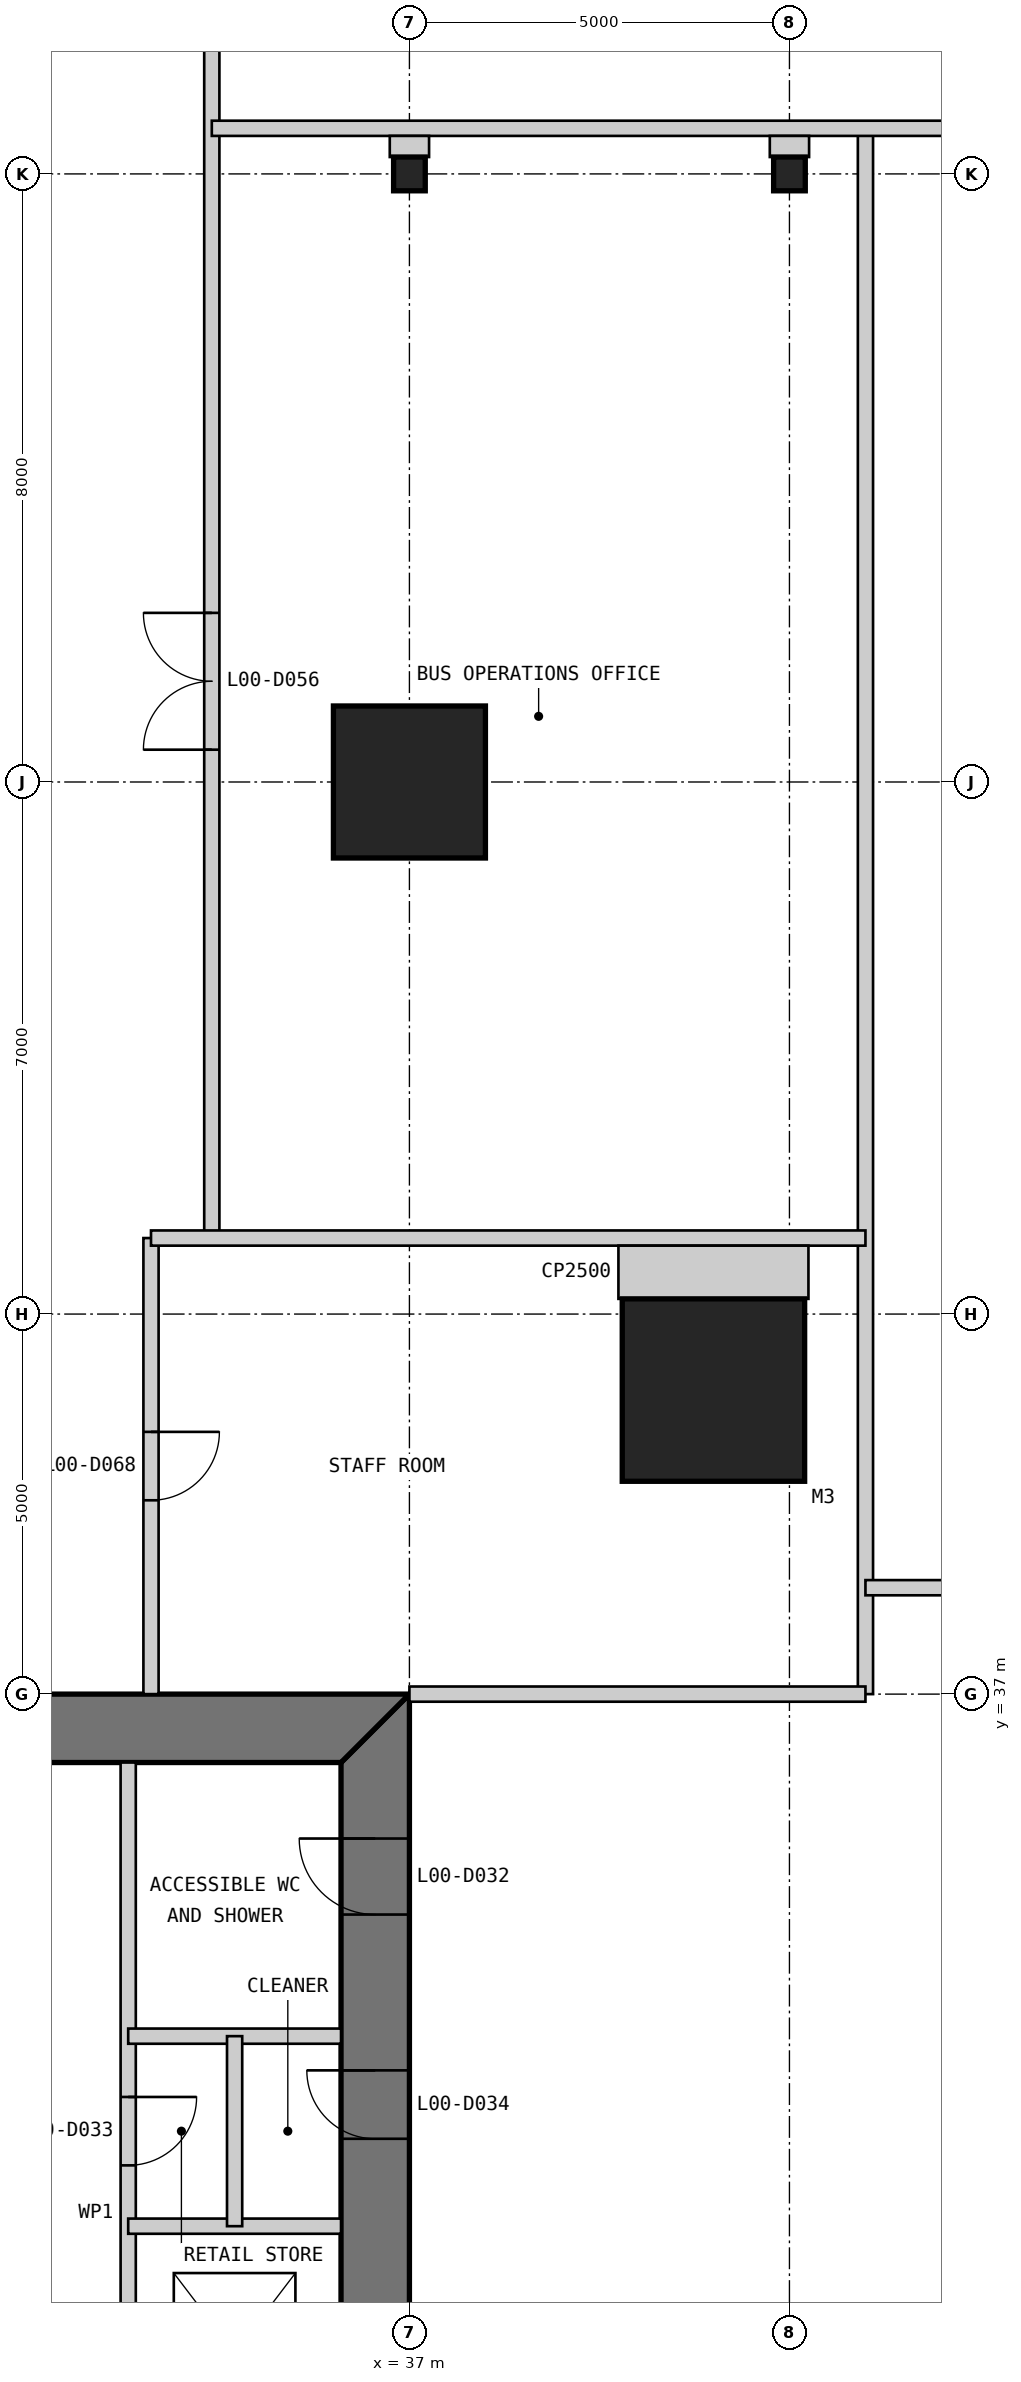
"""IFC4 building model, lengths in metres.
Left out: names, types, materials, properties, quantities, classifications, styles, units other than length and angle.
Written with IfcOpenShell. Run it as: python <this file> out.ifc"""

import sys

from ifc_helpers import new_model, si_unit, direction, frame, frame_2d, origin, origin_2d, place, context, subcontext, project, spatial, polyline, rectangle, i_section, outline, extrude, element, fill, save


model = new_model("IFC4")
c1 = context("Model", 3, precision=1e-05, world=origin(), true_north=direction((0.0, 1.0)))
c2 = subcontext(c1, "Body", "Model", "MODEL_VIEW")
j1 = project(units=[si_unit("LENGTHUNIT", "METRE"), si_unit("PLANEANGLEUNIT", "RADIAN")], contexts=[c1])
p1 = place(None, origin())
s1 = spatial("IfcSite", under=j1, at=p1, CompositionType="ELEMENT")
p2 = place(p1, origin())
s2 = spatial("IfcBuilding", under=s1, at=p2, CompositionType="ELEMENT")
p3 = place(p2, origin())
s3 = spatial("IfcBuildingStorey", under=s2, at=p3, CompositionType="ELEMENT", Elevation=0.0)
p4 = place(p3, frame((41.0, 41.0, 0.0), z_axis=(0.0, 0.0, 1.0), x_axis=(1.0, 0.0, 0.0)))
e1 = element("IfcColumn", 1, at=p4, inside=s3, PredefinedType="COLUMN", context=c2, shape_type="SweptSolid", body=[
    extrude(rectangle(XDim=2.4, YDim=2.4, at=origin_2d()), origin(), (0.0, 0.0, 1.0), 7.0),
])
p5 = place(p3, frame((37.0, 49.0, 0.0), z_axis=(0.0, 0.0, 1.0), x_axis=(1.0, 0.0, 0.0)))
e2 = element("IfcColumn", 2, at=p5, inside=s3, PredefinedType="COLUMN", context=c2, shape_type="SweptSolid", body=[
    extrude(rectangle(XDim=2.0, YDim=2.0, at=origin_2d()), origin(), (0.0, 0.0, 1.0), 7.0),
])
for number, where, z_axis, x_axis in (
    (3, (37.0, 57.0, 0.0), (0.0, 0.0, 1.0), (1.0, 0.0, 0.0)),
    (4, (42.0, 57.0, 0.0), (0.0, 0.0, 1.0), (1.0, 0.0, 0.0)),
):
    element("IfcColumn", number, at=place(p3, frame(where, z_axis=z_axis, x_axis=x_axis)), inside=s3, PredefinedType="COLUMN", context=c2, shape_type="SweptSolid", body=[
        extrude(i_section(OverallWidth=0.417, OverallDepth=0.445, WebThickness=0.039, FlangeThickness=0.063, at=origin_2d()), origin(), (0.0, 0.0, 1.0), 7.0),
    ])
p6 = place(p3, frame((36.55, 13.9, 0.0), z_axis=(0.0, 0.0, 1.0), x_axis=(0.0, 1.0, 0.0)))
e5 = element("IfcWall", 5, at=p6, inside=s3, PredefinedType="SHEAR", context=c2, shape_type="SweptSolid", body=[
    extrude(outline(polyline([(-0.9, -0.45), (23.1, -0.45), (22.2, 0.45), (0.0, 0.45), (-0.9, -0.45)])), origin(), (0.0, 0.0, 1.0), 7.0),
])
p7 = place(p6, frame((20.2, 0.0, 0.0)))
e6 = element("IfcOpeningElement", 6, at=p7, cuts=e5, PredefinedType="OPENING", context=c2, shape_type="SweptSolid", body=[
    extrude(rectangle(XDim=1.0, YDim=2.2, at=frame_2d((0.5, 1.1))), frame((0.0, 0.46, 0.0), z_axis=(0.0, -1.0, 0.0), x_axis=(1.0, 0.0, 0.0)), (0.0, 0.0, 1.0), 0.92),
])
p8 = place(p6, frame((17.25, 0.0, 0.0)))
e7 = element("IfcOpeningElement", 7, at=p8, cuts=e5, PredefinedType="OPENING", context=c2, shape_type="SweptSolid", body=[
    extrude(rectangle(XDim=0.9, YDim=2.2, at=frame_2d((0.45, 1.1))), frame((0.0, 0.46, 0.0), z_axis=(0.0, -1.0, 0.0), x_axis=(1.0, 0.0, 0.0)), (0.0, 0.0, 1.0), 0.92),
])
p9 = place(p3, frame((37.0, 36.55, 0.0), z_axis=(0.0, 0.0, 1.0), x_axis=(-1.0, 0.0, 0.0)))
e8 = element("IfcWall", 8, at=p9, inside=s3, PredefinedType="SHEAR", context=c2, shape_type="SweptSolid", body=[
    extrude(outline(polyline([(0.0, -0.45), (24.0, -0.45), (23.1, 0.45), (0.9, 0.45), (0.0, -0.45)])), origin(), (0.0, 0.0, 1.0), 7.0),
])
p10 = place(p9, frame((4.9, 0.0, 0.0)))
e9 = element("IfcOpeningElement", 9, at=p10, cuts=e8, PredefinedType="OPENING", context=c2, shape_type="SweptSolid", body=[
    extrude(rectangle(XDim=1.0, YDim=2.2, at=frame_2d((0.5, 1.1))), frame((0.0, 0.46, 0.0), z_axis=(0.0, -1.0, 0.0), x_axis=(1.0, 0.0, 0.0)), (0.0, 0.0, 1.0), 0.92),
])
p11 = place(p9, frame((8.9, 0.0, 0.0)))
e10 = element("IfcOpeningElement", 10, at=p11, cuts=e8, PredefinedType="OPENING", context=c2, shape_type="SweptSolid", body=[
    extrude(rectangle(XDim=1.1, YDim=2.2, at=frame_2d((0.55, 1.1))), frame((0.0, 0.46, 0.0), z_axis=(0.0, -1.0, 0.0), x_axis=(1.0, 0.0, 0.0)), (0.0, 0.0, 1.0), 0.92),
])
p12 = place(p9, frame((15.05, 0.0, 0.0)))
e11 = element("IfcOpeningElement", 11, at=p12, cuts=e8, PredefinedType="OPENING", context=c2, shape_type="SweptSolid", body=[
    extrude(rectangle(XDim=0.9, YDim=2.2, at=frame_2d((0.45, 1.1))), frame((0.0, 0.46, 0.0), z_axis=(0.0, -1.0, 0.0), x_axis=(1.0, 0.0, 0.0)), (0.0, 0.0, 1.0), 0.92),
])
p13 = place(p9, frame((17.9, 0.0, 0.0)))
e12 = element("IfcOpeningElement", 12, at=p13, cuts=e8, PredefinedType="OPENING", context=c2, shape_type="SweptSolid", body=[
    extrude(rectangle(XDim=1.0, YDim=2.2, at=frame_2d((0.5, 1.1))), frame((0.0, 0.46, 0.0), z_axis=(0.0, -1.0, 0.0), x_axis=(1.0, 0.0, 0.0)), (0.0, 0.0, 1.0), 0.92),
])
p14 = place(p9, frame((21.4, 0.0, 0.0)))
e13 = element("IfcOpeningElement", 13, at=p14, cuts=e8, PredefinedType="OPENING", context=c2, shape_type="SweptSolid", body=[
    extrude(rectangle(XDim=1.0, YDim=2.2, at=frame_2d((0.5, 1.1))), frame((0.0, 0.46, 0.0), z_axis=(0.0, -1.0, 0.0), x_axis=(1.0, 0.0, 0.0)), (0.0, 0.0, 1.0), 0.92),
])
p15 = place(p3, frame((33.3, 36.1, 0.0), z_axis=(0.0, 0.0, 1.0), x_axis=(0.0, -1.0, 0.0)))
e14 = element("IfcWall", 14, at=p15, inside=s3, PredefinedType="PARTITIONING", context=c2, shape_type="SweptSolid", body=[
    extrude(rectangle(XDim=16.1, YDim=0.2, at=frame_2d((8.05, 0.0))), origin(), (0.0, 0.0, 1.0), 6.8),
])
p16 = place(p15, frame((4.4, 0.0, 0.0)))
e15 = element("IfcOpeningElement", 15, at=p16, cuts=e14, PredefinedType="OPENING", context=c2, shape_type="SweptSolid", body=[
    extrude(rectangle(XDim=0.9, YDim=2.2, at=frame_2d((0.45, 1.1))), frame((0.0, 0.11, 0.0), z_axis=(0.0, -1.0, 0.0), x_axis=(1.0, 0.0, 0.0)), (0.0, 0.0, 1.0), 0.22),
])
p17 = place(p15, frame((7.217, 0.0, 0.0)))
e16 = element("IfcOpeningElement", 16, at=p17, cuts=e14, PredefinedType="OPENING", context=c2, shape_type="SweptSolid", body=[
    extrude(rectangle(XDim=1.1, YDim=2.2, at=frame_2d((0.55, 1.1))), frame((0.0, 0.11, 0.0), z_axis=(0.0, -1.0, 0.0), x_axis=(1.0, 0.0, 0.0)), (0.0, 0.0, 1.0), 0.22),
])
p18 = place(p15, frame((10.55, 0.0, 0.0)))
e17 = element("IfcOpeningElement", 17, at=p18, cuts=e14, PredefinedType="OPENING", context=c2, shape_type="SweptSolid", body=[
    extrude(rectangle(XDim=1.1, YDim=2.2, at=frame_2d((0.55, 1.1))), frame((0.0, 0.11, 0.0), z_axis=(0.0, -1.0, 0.0), x_axis=(1.0, 0.0, 0.0)), (0.0, 0.0, 1.0), 0.22),
])
p19 = place(p15, frame((13.883, 0.0, 0.0)))
e18 = element("IfcOpeningElement", 18, at=p19, cuts=e14, PredefinedType="OPENING", context=c2, shape_type="SweptSolid", body=[
    extrude(rectangle(XDim=1.1, YDim=2.2, at=frame_2d((0.55, 1.1))), frame((0.0, 0.11, 0.0), z_axis=(0.0, -1.0, 0.0), x_axis=(1.0, 0.0, 0.0)), (0.0, 0.0, 1.0), 0.22),
])
for number, where, z_axis, x_axis in (
    (19, (36.1, 30.0, 0.0), (0.0, 0.0, 1.0), (-1.0, 0.0, 0.0)),
    (20, (36.1, 32.5, 0.0), (0.0, 0.0, 1.0), (-1.0, 0.0, 0.0)),
):
    element("IfcWall", number, at=place(p3, frame(where, z_axis=z_axis, x_axis=x_axis)), inside=s3, PredefinedType="PARTITIONING", context=c2, shape_type="SweptSolid", body=[
        extrude(rectangle(XDim=2.8, YDim=0.2, at=frame_2d((1.4, 0.0))), origin(), (0.0, 0.0, 1.0), 6.8),
    ])
p20 = place(p3, frame((34.7, 32.5, 0.0), z_axis=(0.0, 0.0, 1.0), x_axis=(0.0, -1.0, 0.0)))
e21 = element("IfcWall", 21, at=p20, inside=s3, PredefinedType="PARTITIONING", context=c2, shape_type="SweptSolid", body=[
    extrude(rectangle(XDim=2.5, YDim=0.2, at=frame_2d((1.25, 0.0))), origin(), (0.0, 0.0, 1.0), 6.8),
])
p21 = place(p3, frame((33.6, 37.0, 0.0), z_axis=(0.0, 0.0, 1.0), x_axis=(0.0, 1.0, 0.0)))
e22 = element("IfcWall", 22, at=p21, inside=s3, PredefinedType="PARTITIONING", context=c2, shape_type="SweptSolid", body=[
    extrude(rectangle(XDim=6.0, YDim=0.2, at=frame_2d((3.0, 0.0))), origin(), (0.0, 0.0, 1.0), 6.7),
])
p22 = place(p21, frame((2.55, 0.0, 0.0)))
e23 = element("IfcOpeningElement", 23, at=p22, cuts=e22, PredefinedType="OPENING", context=c2, shape_type="SweptSolid", body=[
    extrude(rectangle(XDim=0.9, YDim=2.2, at=frame_2d((0.45, 1.1))), frame((0.0, 0.11, 0.0), z_axis=(0.0, -1.0, 0.0), x_axis=(1.0, 0.0, 0.0)), (0.0, 0.0, 1.0), 0.22),
])
p23 = place(p3, frame((34.4, 43.0, 0.0), z_axis=(0.0, 0.0, 1.0), x_axis=(0.0, 1.0, 0.0)))
e24 = element("IfcWall", 24, at=p23, inside=s3, PredefinedType="PARTITIONING", context=c2, shape_type="SweptSolid", body=[
    extrude(rectangle(XDim=22.25, YDim=0.2, at=frame_2d((11.125, 0.0))), origin(), (0.0, 0.0, 1.0), 6.7),
])
p24 = place(p23, frame((6.425, 0.0, 0.0)))
e25 = element("IfcOpeningElement", 25, at=p24, cuts=e24, PredefinedType="OPENING", context=c2, shape_type="SweptSolid", body=[
    extrude(rectangle(XDim=1.8, YDim=2.4, at=frame_2d((0.9, 1.2))), frame((0.0, 0.11, 0.0), z_axis=(0.0, -1.0, 0.0), x_axis=(1.0, 0.0, 0.0)), (0.0, 0.0, 1.0), 0.22),
])
p25 = place(p23, frame((17.5, 0.0, 0.0)))
e26 = element("IfcOpeningElement", 26, at=p25, cuts=e24, PredefinedType="OPENING", context=c2, shape_type="SweptSolid", body=[
    extrude(rectangle(XDim=1.8, YDim=2.4, at=frame_2d((0.9, 1.2))), frame((0.0, 0.11, 0.0), z_axis=(0.0, -1.0, 0.0), x_axis=(1.0, 0.0, 0.0)), (0.0, 0.0, 1.0), 0.22),
])
p26 = place(p3, frame((43.0, 37.0, 0.0), z_axis=(0.0, 0.0, 1.0), x_axis=(0.0, 1.0, 0.0)))
e27 = element("IfcWall", 27, at=p26, inside=s3, PredefinedType="PARTITIONING", context=c2, shape_type="SweptSolid", body=[
    extrude(rectangle(XDim=20.6, YDim=0.2, at=frame_2d((10.3, 0.0))), origin(), (0.0, 0.0, 1.0), 6.7),
])
p27 = place(p3, frame((37.0, 37.0, 0.0), z_axis=(0.0, 0.0, 1.0), x_axis=(1.0, 0.0, 0.0)))
e28 = element("IfcWall", 28, at=p27, inside=s3, PredefinedType="PARTITIONING", context=c2, shape_type="SweptSolid", body=[
    extrude(rectangle(XDim=6.0, YDim=0.2, at=frame_2d((3.0, 0.0))), origin(), (0.0, 0.0, 1.0), 5.853),
])
p28 = place(p3, frame((43.0, 38.4, 0.0), z_axis=(0.0, 0.0, 1.0), x_axis=(1.0, 0.0, 0.0)))
e29 = element("IfcWall", 29, at=p28, inside=s3, PredefinedType="PARTITIONING", context=c2, shape_type="SweptSolid", body=[
    extrude(rectangle(XDim=7.6, YDim=0.2, at=frame_2d((3.8, 0.0))), origin(), (0.0, 0.0, 1.0), 6.7),
])
p29 = place(p28, frame((2.9, 0.0, 0.0)))
e30 = element("IfcOpeningElement", 30, at=p29, cuts=e29, PredefinedType="OPENING", context=c2, shape_type="SweptSolid", body=[
    extrude(rectangle(XDim=1.8, YDim=2.4, at=frame_2d((0.9, 1.2))), frame((0.0, 0.11, 0.0), z_axis=(0.0, -1.0, 0.0), x_axis=(1.0, 0.0, 0.0)), (0.0, 0.0, 1.0), 0.22),
])
p30 = place(p3, frame((33.6, 43.0, 0.0), z_axis=(0.0, 0.0, 1.0), x_axis=(1.0, 0.0, 0.0)))
e31 = element("IfcWall", 31, at=p30, inside=s3, PredefinedType="PARTITIONING", context=c2, shape_type="SweptSolid", body=[
    extrude(rectangle(XDim=9.4, YDim=0.2, at=frame_2d((4.7, 0.0))), origin(), (0.0, 0.0, 1.0), 6.7),
])
p31 = place(p3, frame((34.4, 57.6, 0.0), z_axis=(0.0, 0.0, 1.0), x_axis=(1.0, 0.0, 0.0)))
e32 = element("IfcWall", 32, at=p31, inside=s3, PredefinedType="PARTITIONING", context=c2, shape_type="SweptSolid", body=[
    extrude(rectangle(XDim=16.2, YDim=0.2, at=frame_2d((8.1, 0.0))), origin(), (0.0, 0.0, 1.0), 6.7),
])
for number, where, z_axis, x_axis in (
    (33, (37.0, 57.5, 0.0), (0.0, 0.0, 1.0), (0.0, -1.0, 0.0)),
    (34, (42.0, 57.5, 0.0), (0.0, 0.0, 1.0), (0.0, -1.0, 0.0)),
):
    element("IfcWall", number, at=place(p3, frame(where, z_axis=z_axis, x_axis=x_axis)), inside=s3, PredefinedType="PARTITIONING", context=c2, shape_type="SweptSolid", body=[
        extrude(rectangle(XDim=0.278, YDim=0.517, at=frame_2d((0.139, 0.0))), origin(), (0.0, 0.0, 1.0), 6.7),
    ])
p32 = place(p3, frame((41.0, 42.9, 0.0), z_axis=(0.0, 0.0, 1.0), x_axis=(0.0, -1.0, 0.0)))
e35 = element("IfcWall", 35, at=p32, inside=s3, PredefinedType="PARTITIONING", context=c2, shape_type="SweptSolid", body=[
    extrude(rectangle(XDim=0.7, YDim=2.5, at=frame_2d((0.35, 0.0))), origin(), (0.0, 0.0, 1.0), 6.7),
])
p33 = place(p7, origin())
e36 = element("IfcDoor", 36, at=p33, inside=s3, OperationType="SINGLE_SWING_RIGHT", PredefinedType="DOOR", context=c2, shape_type="SweptSolid", body=[
    extrude(rectangle(XDim=1.0, YDim=2.2, at=frame_2d((0.5, 1.1))), frame((0.0, 0.025, 0.0), z_axis=(0.0, -1.0, 0.0), x_axis=(1.0, 0.0, 0.0)), (0.0, 0.0, 1.0), 0.05),
    extrude(outline(polyline([(0.0, 0.0), (0.04, 0.0), (0.04, 2.16), (0.96, 2.16), (0.96, 0.0), (1.0, 0.0), (1.0, 2.2), (0.0, 2.2), (0.0, 0.0)])), frame((0.0, 0.3, 0.0), z_axis=(0.0, -1.0, 0.0), x_axis=(1.0, 0.0, 0.0)), (0.0, 0.0, 1.0), 0.6),
])
fill(e6, e36)
p34 = place(p16, origin())
e37 = element("IfcDoor", 37, at=p34, inside=s3, OperationType="SINGLE_SWING_LEFT", PredefinedType="DOOR", context=c2, shape_type="SweptSolid", body=[
    extrude(rectangle(XDim=0.9, YDim=2.2, at=frame_2d((0.45, 1.1))), frame((0.0, 0.025, 0.0), z_axis=(0.0, -1.0, 0.0), x_axis=(1.0, 0.0, 0.0)), (0.0, 0.0, 1.0), 0.05),
])
fill(e15, e37)
p35 = place(p8, origin())
e38 = element("IfcDoor", 38, at=p35, inside=s3, OperationType="SINGLE_SWING_RIGHT", PredefinedType="DOOR", context=c2, shape_type="SweptSolid", body=[
    extrude(rectangle(XDim=0.9, YDim=2.2, at=frame_2d((0.45, 1.1))), frame((0.0, 0.025, 0.0), z_axis=(0.0, -1.0, 0.0), x_axis=(1.0, 0.0, 0.0)), (0.0, 0.0, 1.0), 0.05),
    extrude(outline(polyline([(0.0, 0.0), (0.04, 0.0), (0.04, 2.16), (0.86, 2.16), (0.86, 0.0), (0.9, 0.0), (0.9, 2.2), (0.0, 2.2), (0.0, 0.0)])), frame((0.0, 0.3, 0.0), z_axis=(0.0, -1.0, 0.0), x_axis=(1.0, 0.0, 0.0)), (0.0, 0.0, 1.0), 0.6),
])
fill(e7, e38)
p36 = place(p24, origin())
e39 = element("IfcDoor", 39, at=p36, inside=s3, OperationType="DOUBLE_DOOR_SINGLE_SWING", PredefinedType="DOOR", context=c2, shape_type="SweptSolid", body=[
    extrude(rectangle(XDim=1.8, YDim=2.4, at=frame_2d((0.9, 1.2))), frame((0.0, 0.025, 0.0), z_axis=(0.0, -1.0, 0.0), x_axis=(1.0, 0.0, 0.0)), (0.0, 0.0, 1.0), 0.05),
])
fill(e25, e39)
p37 = place(p22, frame((0.9, 0.0, 0.0), z_axis=(0.0, 0.0, 1.0), x_axis=(-1.0, 0.0, 0.0)))
e40 = element("IfcDoor", 40, at=p37, inside=s3, OperationType="SINGLE_SWING_LEFT", PredefinedType="DOOR", context=c2, shape_type="SweptSolid", body=[
    extrude(rectangle(XDim=0.9, YDim=2.2, at=frame_2d((0.45, 1.1))), frame((0.0, 0.025, 0.0), z_axis=(0.0, -1.0, 0.0), x_axis=(1.0, 0.0, 0.0)), (0.0, 0.0, 1.0), 0.05),
])
fill(e23, e40)
save(model, sys.argv[1])
